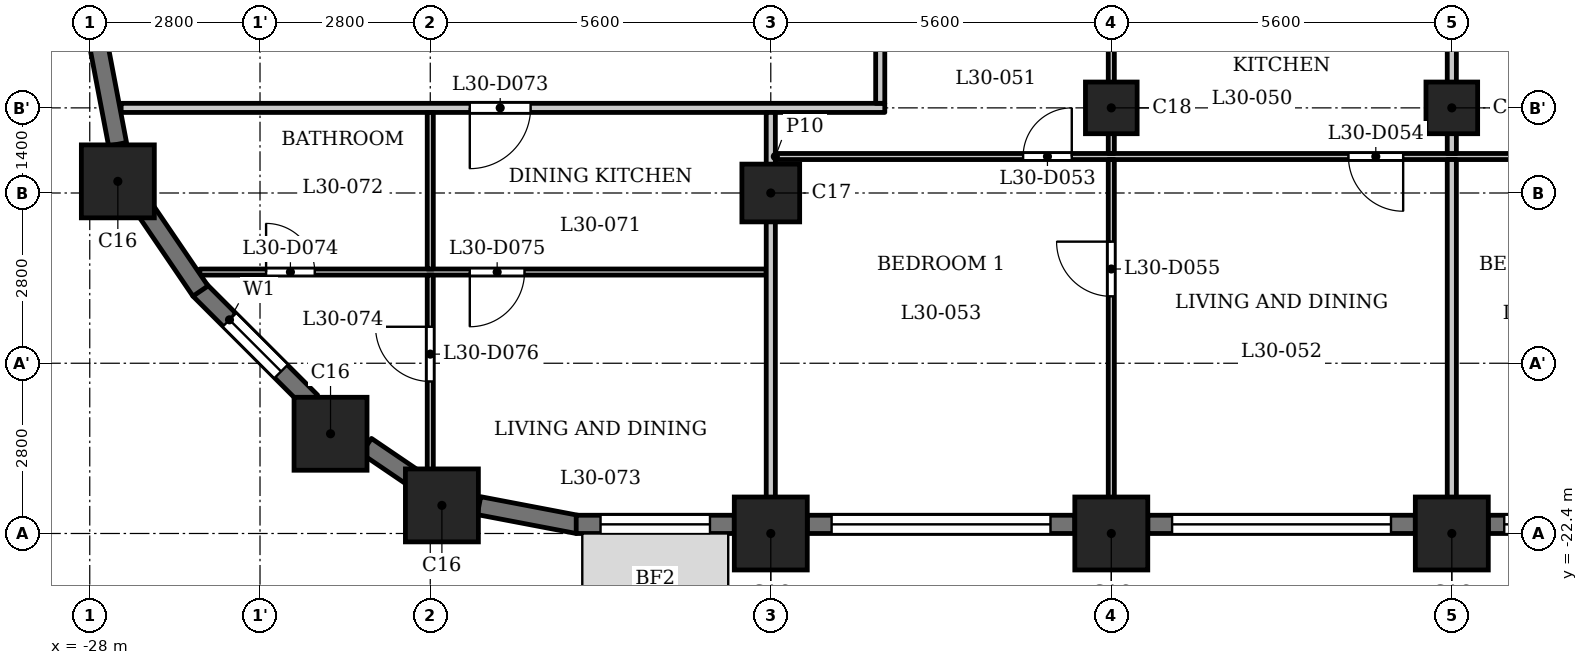
"""IFC4 building model, lengths in metres.
Left out: names, types, materials, properties, quantities, classifications, styles, units other than length and angle.
Written with IfcOpenShell. Run it as: python <this file> out.ifc"""

import sys

from ifc_helpers import new_model, si_unit, direction, frame, frame_2d, origin, origin_2d, place, context, subcontext, project, spatial, rectangle, extrude, element, fill, save


model = new_model("IFC4")
c1 = context("Model", 3, precision=1e-05, world=origin(), true_north=direction((0.0, 1.0)))
c2 = subcontext(c1, "Body", "Model", "MODEL_VIEW")
j1 = project(units=[si_unit("LENGTHUNIT", "METRE"), si_unit("PLANEANGLEUNIT", "RADIAN")], contexts=[c1])
p1 = place(None, origin())
s1 = spatial("IfcSite", under=j1, at=p1, CompositionType="ELEMENT")
p2 = place(p1, origin())
s2 = spatial("IfcBuilding", under=s1, at=p2, CompositionType="ELEMENT")
p3 = place(p2, frame((0.0, 0.0, 118.3)))
s3 = spatial("IfcBuildingStorey", under=s2, at=p3, CompositionType="ELEMENT", Elevation=118.3)
for number, where, z_axis, x_axis in (
    (1, (-22.209, -21.938, 0.0), (0.0, 0.0, 1.0), (1.0, 0.0, 0.0)),
    (2, (-16.8, -22.4, 0.0), (0.0, 0.0, 1.0), (1.0, 0.0, 0.0)),
    (3, (-11.2, -22.4, 0.0), (0.0, 0.0, 1.0), (1.0, 0.0, 0.0)),
    (4, (-5.6, -22.4, 0.0), (0.0, 0.0, 1.0), (1.0, 0.0, 0.0)),
    (5, (-27.538, -16.609, 0.0), (0.0, 0.0, 1.0), (1.0, 0.0, 0.0)),
    (6, (-24.04, -20.76, 0.0), (0.0, 0.0, 1.0), (1.0, 0.0, 0.0)),
):
    element("IfcColumn", number, at=place(p3, frame(where, z_axis=z_axis, x_axis=x_axis)), inside=s3, PredefinedType="COLUMN", context=c2, shape_type="SweptSolid", body=[
        extrude(rectangle(XDim=1.2, YDim=1.2, at=origin_2d()), origin(), (0.0, 0.0, 1.0), 3.5),
    ])
p4 = place(p3, frame((-16.8, -16.8, 0.0), z_axis=(0.0, 0.0, 1.0), x_axis=(1.0, 0.0, 0.0)))
e7 = element("IfcColumn", 7, at=p4, inside=s3, PredefinedType="COLUMN", context=c2, shape_type="SweptSolid", body=[
    extrude(rectangle(XDim=0.95, YDim=0.95, at=origin_2d()), origin(), (0.0, 0.0, 1.0), 3.5),
])
for number, where, z_axis, x_axis in (
    (8, (-11.2, -15.4, 0.0), (0.0, 0.0, 1.0), (1.0, 0.0, 0.0)),
    (9, (-5.6, -15.4, 0.0), (0.0, 0.0, 1.0), (1.0, 0.0, 0.0)),
):
    element("IfcColumn", number, at=place(p3, frame(where, z_axis=z_axis, x_axis=x_axis)), inside=s3, PredefinedType="COLUMN", context=c2, shape_type="SweptSolid", body=[
        extrude(rectangle(XDim=0.85, YDim=0.85, at=origin_2d()), origin(), (0.0, 0.0, 1.0), 3.5),
    ])
p5 = place(p3, frame((-26.197, -18.391, 0.0), z_axis=(0.0, 0.0, 1.0), x_axis=(0.707059830104, -0.707153729152, 0.0)))
e10 = element("IfcWall", 10, at=p5, inside=s3, PredefinedType="SOLIDWALL", context=c2, shape_type="SweptSolid", body=[
    extrude(rectangle(XDim=2.6, YDim=0.3, at=frame_2d((1.3, 0.0))), origin(), (0.0, 0.0, 1.0), 2.4),
])
p6 = place(p5, frame((0.7, 0.0, 0.6)))
e11 = element("IfcOpeningElement", 11, at=p6, cuts=e10, PredefinedType="OPENING", context=c2, shape_type="SweptSolid", body=[
    extrude(rectangle(XDim=1.2, YDim=1.55, at=frame_2d((0.6, 0.775))), frame((0.0, 0.16, 0.0), z_axis=(0.0, -1.0, 0.0), x_axis=(1.0, 0.0, 0.0)), (0.0, 0.0, 1.0), 0.32),
])
p7 = place(p3, frame((-23.451, -20.96, 0.0), z_axis=(0.0, 0.0, 1.0), x_axis=(0.827019434577, -0.562173331661, 0.0)))
e12 = element("IfcWall", 12, at=p7, inside=s3, PredefinedType="SOLIDWALL", context=c2, shape_type="SweptSolid", body=[
    extrude(rectangle(XDim=0.977, YDim=0.3, at=frame_2d((0.489, 0.0))), origin(), (0.0, 0.0, 1.0), 3.2),
])
p8 = place(p3, frame((-21.599, -21.942, 0.0), z_axis=(0.0, 0.0, 1.0), x_axis=(0.98228820662, -0.187376303559, 0.0)))
e13 = element("IfcWall", 13, at=p8, inside=s3, PredefinedType="SOLIDWALL", context=c2, shape_type="SweptSolid", body=[
    extrude(rectangle(XDim=1.656, YDim=0.3, at=frame_2d((0.828, 0.0))), origin(), (0.0, 0.0, 1.0), 2.4),
])
p9 = place(p3, frame((-20.0, -22.25, 0.0), z_axis=(0.0, 0.0, 1.0), x_axis=(1.0, 0.0, 0.0)))
e14 = element("IfcWall", 14, at=p9, inside=s3, PredefinedType="SOLIDWALL", context=c2, shape_type="SweptSolid", body=[
    extrude(rectangle(XDim=2.6, YDim=0.3, at=frame_2d((1.3, 0.0))), origin(), (0.0, 0.0, 1.0), 2.4),
])
p10 = place(p9, frame((0.4, 0.0, 0.9)))
e15 = element("IfcOpeningElement", 15, at=p10, cuts=e14, PredefinedType="OPENING", context=c2, shape_type="SweptSolid", body=[
    extrude(rectangle(XDim=1.8, YDim=1.25, at=frame_2d((0.9, 0.625))), frame((0.0, 0.16, 0.0), z_axis=(0.0, -1.0, 0.0), x_axis=(1.0, 0.0, 0.0)), (0.0, 0.0, 1.0), 0.32),
])
p11 = place(p3, frame((-16.2, -22.25, 0.0), z_axis=(0.0, 0.0, 1.0), x_axis=(1.0, 0.0, 0.0)))
e16 = element("IfcWall", 16, at=p11, inside=s3, PredefinedType="SOLIDWALL", context=c2, shape_type="SweptSolid", body=[
    extrude(rectangle(XDim=4.4, YDim=0.3, at=frame_2d((2.2, 0.0))), origin(), (0.0, 0.0, 1.0), 2.4),
])
p12 = place(p11, frame((0.4, 0.0, 1.2)))
e17 = element("IfcOpeningElement", 17, at=p12, cuts=e16, PredefinedType="OPENING", context=c2, shape_type="SweptSolid", body=[
    extrude(rectangle(XDim=3.6, YDim=0.95, at=frame_2d((1.8, 0.475))), frame((0.0, 0.16, 0.0), z_axis=(0.0, -1.0, 0.0), x_axis=(1.0, 0.0, 0.0)), (0.0, 0.0, 1.0), 0.32),
])
p13 = place(p3, frame((-10.6, -22.25, 0.0), z_axis=(0.0, 0.0, 1.0), x_axis=(1.0, 0.0, 0.0)))
e18 = element("IfcWall", 18, at=p13, inside=s3, PredefinedType="SOLIDWALL", context=c2, shape_type="SweptSolid", body=[
    extrude(rectangle(XDim=4.4, YDim=0.3, at=frame_2d((2.2, 0.0))), origin(), (0.0, 0.0, 1.0), 2.4),
])
p14 = place(p13, frame((0.4, 0.0, 1.2)))
e19 = element("IfcOpeningElement", 19, at=p14, cuts=e18, PredefinedType="OPENING", context=c2, shape_type="SweptSolid", body=[
    extrude(rectangle(XDim=3.6, YDim=0.95, at=frame_2d((1.8, 0.475))), frame((0.0, 0.16, 0.0), z_axis=(0.0, -1.0, 0.0), x_axis=(1.0, 0.0, 0.0)), (0.0, 0.0, 1.0), 0.32),
])
p15 = place(p3, frame((-5.0, -22.25, 0.0), z_axis=(0.0, 0.0, 1.0), x_axis=(1.0, 0.0, 0.0)))
e20 = element("IfcWall", 20, at=p15, inside=s3, PredefinedType="SOLIDWALL", context=c2, shape_type="SweptSolid", body=[
    extrude(rectangle(XDim=4.4, YDim=0.3, at=frame_2d((2.2, 0.0))), origin(), (0.0, 0.0, 1.0), 2.4),
])
p16 = place(p15, frame((0.262, 0.0, 0.9)))
e21 = element("IfcOpeningElement", 21, at=p16, cuts=e20, PredefinedType="OPENING", context=c2, shape_type="SweptSolid", body=[
    extrude(rectangle(XDim=1.8, YDim=1.25, at=frame_2d((0.9, 0.625))), frame((0.0, 0.16, 0.0), z_axis=(0.0, -1.0, 0.0), x_axis=(1.0, 0.0, 0.0)), (0.0, 0.0, 1.0), 0.32),
])
p17 = place(p15, frame((2.837, 0.0, 0.6)))
e22 = element("IfcOpeningElement", 22, at=p17, cuts=e20, PredefinedType="OPENING", context=c2, shape_type="SweptSolid", body=[
    extrude(rectangle(XDim=1.2, YDim=1.55, at=frame_2d((0.6, 0.775))), frame((0.0, 0.16, 0.0), z_axis=(0.0, -1.0, 0.0), x_axis=(1.0, 0.0, 0.0)), (0.0, 0.0, 1.0), 0.32),
])
for number, where, z_axis, x_axis in (
    (23, (-27.853, -14.372, 0.0), (0.0, 0.0, 1.0), (0.187, -0.982, 0.0)),
    (24, (-27.11, -17.043, 0.0), (0.0, 0.0, 1.0), (0.562, -0.827, 0.0)),
):
    element("IfcWall", number, at=place(p3, frame(where, z_axis=z_axis, x_axis=x_axis)), inside=s3, PredefinedType="SOLIDWALL", context=c2, shape_type="SweptSolid", body=[
        extrude(rectangle(XDim=1.656, YDim=0.3, at=frame_2d((0.828, 0.0))), origin(), (0.0, 0.0, 1.0), 2.4),
    ])
p18 = place(p3, frame((-26.19, -18.1, 0.0), z_axis=(0.0, 0.0, 1.0), x_axis=(1.0, 0.0, 0.0)))
e25 = element("IfcWall", 25, at=p18, inside=s3, PredefinedType="PARTITIONING", context=c2, shape_type="SweptSolid", body=[
    extrude(rectangle(XDim=9.315, YDim=0.1, at=frame_2d((4.658, 0.0))), origin(), (0.0, 0.0, 1.0), 3.2),
])
p19 = place(p18, frame((1.09, 0.0, 0.0)))
e26 = element("IfcOpeningElement", 26, at=p19, cuts=e25, PredefinedType="OPENING", context=c2, shape_type="SweptSolid", body=[
    extrude(rectangle(XDim=0.8, YDim=2.1, at=frame_2d((0.4, 1.05))), frame((0.0, 0.06, 0.0), z_axis=(0.0, -1.0, 0.0), x_axis=(1.0, 0.0, 0.0)), (0.0, 0.0, 1.0), 0.12),
])
p20 = place(p18, frame((4.44, 0.0, 0.0)))
e27 = element("IfcOpeningElement", 27, at=p20, cuts=e25, PredefinedType="OPENING", context=c2, shape_type="SweptSolid", body=[
    extrude(rectangle(XDim=0.9, YDim=2.1, at=frame_2d((0.45, 1.05))), frame((0.0, 0.06, 0.0), z_axis=(0.0, -1.0, 0.0), x_axis=(1.0, 0.0, 0.0)), (0.0, 0.0, 1.0), 0.12),
])
p21 = place(p3, frame((-16.725, -16.2, 0.0), z_axis=(0.0, 0.0, 1.0), x_axis=(1.0, 0.0, 0.0)))
e28 = element("IfcWall", 28, at=p21, inside=s3, PredefinedType="PARTITIONING", context=c2, shape_type="SweptSolid", body=[
    extrude(rectangle(XDim=33.45, YDim=0.1, at=frame_2d((16.725, 0.0))), origin(), (0.0, 0.0, 1.0), 3.2),
])
p22 = place(p21, frame((4.075, 0.0, 0.0)))
e29 = element("IfcOpeningElement", 29, at=p22, cuts=e28, PredefinedType="OPENING", context=c2, shape_type="SweptSolid", body=[
    extrude(rectangle(XDim=0.8, YDim=2.1, at=frame_2d((0.4, 1.05))), frame((0.0, 0.06, 0.0), z_axis=(0.0, -1.0, 0.0), x_axis=(1.0, 0.0, 0.0)), (0.0, 0.0, 1.0), 0.12),
])
p23 = place(p21, frame((9.425, 0.0, 0.0)))
e30 = element("IfcOpeningElement", 30, at=p23, cuts=e28, PredefinedType="OPENING", context=c2, shape_type="SweptSolid", body=[
    extrude(rectangle(XDim=0.9, YDim=2.1, at=frame_2d((0.45, 1.05))), frame((0.0, 0.06, 0.0), z_axis=(0.0, -1.0, 0.0), x_axis=(1.0, 0.0, 0.0)), (0.0, 0.0, 1.0), 0.12),
])
p24 = place(p21, frame((19.875, 0.0, 0.0)))
e31 = element("IfcOpeningElement", 31, at=p24, cuts=e28, PredefinedType="OPENING", context=c2, shape_type="SweptSolid", body=[
    extrude(rectangle(XDim=0.8, YDim=2.1, at=frame_2d((0.4, 1.05))), frame((0.0, 0.06, 0.0), z_axis=(0.0, -1.0, 0.0), x_axis=(1.0, 0.0, 0.0)), (0.0, 0.0, 1.0), 0.12),
])
p25 = place(p21, frame((17.375, 0.0, 0.0)))
e32 = element("IfcOpeningElement", 32, at=p25, cuts=e28, PredefinedType="OPENING", context=c2, shape_type="SweptSolid", body=[
    extrude(rectangle(XDim=0.9, YDim=2.1, at=frame_2d((0.45, 1.05))), frame((0.0, 0.06, 0.0), z_axis=(0.0, -1.0, 0.0), x_axis=(1.0, 0.0, 0.0)), (0.0, 0.0, 1.0), 0.12),
])
p26 = place(p21, frame((12.525, 0.0, 0.0)))
e33 = element("IfcOpeningElement", 33, at=p26, cuts=e28, PredefinedType="OPENING", context=c2, shape_type="SweptSolid", body=[
    extrude(rectangle(XDim=0.9, YDim=2.1, at=frame_2d((0.45, 1.05))), frame((0.0, 0.06, 0.0), z_axis=(0.0, -1.0, 0.0), x_axis=(1.0, 0.0, 0.0)), (0.0, 0.0, 1.0), 0.12),
])
p27 = place(p21, frame((14.775, 0.0, 0.0)))
e34 = element("IfcOpeningElement", 34, at=p27, cuts=e28, PredefinedType="OPENING", context=c2, shape_type="SweptSolid", body=[
    extrude(rectangle(XDim=0.9, YDim=2.1, at=frame_2d((0.45, 1.05))), frame((0.0, 0.06, 0.0), z_axis=(0.0, -1.0, 0.0), x_axis=(1.0, 0.0, 0.0)), (0.0, 0.0, 1.0), 0.12),
])
p28 = place(p21, frame((26.475, 0.0, 0.0)))
e35 = element("IfcOpeningElement", 35, at=p28, cuts=e28, PredefinedType="OPENING", context=c2, shape_type="SweptSolid", body=[
    extrude(rectangle(XDim=0.8, YDim=2.1, at=frame_2d((0.4, 1.05))), frame((0.0, 0.06, 0.0), z_axis=(0.0, -1.0, 0.0), x_axis=(1.0, 0.0, 0.0)), (0.0, 0.0, 1.0), 0.12),
])
p29 = place(p21, frame((23.725, 0.0, 0.0)))
e36 = element("IfcOpeningElement", 36, at=p29, cuts=e28, PredefinedType="OPENING", context=c2, shape_type="SweptSolid", body=[
    extrude(rectangle(XDim=0.9, YDim=2.1, at=frame_2d((0.45, 1.05))), frame((0.0, 0.06, 0.0), z_axis=(0.0, -1.0, 0.0), x_axis=(1.0, 0.0, 0.0)), (0.0, 0.0, 1.0), 0.12),
])
p30 = place(p21, frame((29.075, 0.0, 0.0)))
e37 = element("IfcOpeningElement", 37, at=p30, cuts=e28, PredefinedType="OPENING", context=c2, shape_type="SweptSolid", body=[
    extrude(rectangle(XDim=0.8, YDim=2.1, at=frame_2d((0.4, 1.05))), frame((0.0, 0.06, 0.0), z_axis=(0.0, -1.0, 0.0), x_axis=(1.0, 0.0, 0.0)), (0.0, 0.0, 1.0), 0.12),
])
p31 = place(p21, frame((30.675, 0.0, 0.0)))
e38 = element("IfcOpeningElement", 38, at=p31, cuts=e28, PredefinedType="OPENING", context=c2, shape_type="SweptSolid", body=[
    extrude(rectangle(XDim=0.9, YDim=2.1, at=frame_2d((0.45, 1.05))), frame((0.0, 0.06, 0.0), z_axis=(0.0, -1.0, 0.0), x_axis=(1.0, 0.0, 0.0)), (0.0, 0.0, 1.0), 0.12),
])
p32 = place(p3, frame((-27.484, -15.4, 0.0), z_axis=(0.0, 0.0, 1.0), x_axis=(1.0, 0.0, 0.0)))
e39 = element("IfcWall", 39, at=p32, inside=s3, PredefinedType="PARTITIONING", context=c2, shape_type="SweptSolid", body=[
    extrude(rectangle(XDim=12.559, YDim=0.15, at=frame_2d((6.279, 0.0))), origin(), (0.0, 0.0, 1.0), 3.2),
])
p33 = place(p32, frame((5.734, 0.0, 0.0)))
e40 = element("IfcOpeningElement", 40, at=p33, cuts=e39, PredefinedType="OPENING", context=c2, shape_type="SweptSolid", body=[
    extrude(rectangle(XDim=1.0, YDim=2.1, at=frame_2d((0.5, 1.05))), frame((0.0, 0.085, 0.0), z_axis=(0.0, -1.0, 0.0), x_axis=(1.0, 0.0, 0.0)), (0.0, 0.0, 1.0), 0.17),
])
p34 = place(p3, frame((-22.4, -21.72, 0.0), z_axis=(0.0, 0.0, 1.0), x_axis=(0.0, 1.0, 0.0)))
e41 = element("IfcWall", 41, at=p34, inside=s3, PredefinedType="PARTITIONING", context=c2, shape_type="SweptSolid", body=[
    extrude(rectangle(XDim=3.57, YDim=0.1, at=frame_2d((1.785, 0.0))), origin(), (0.0, 0.0, 1.0), 3.2),
])
p35 = place(p34, frame((1.82, 0.0, 0.0)))
e42 = element("IfcOpeningElement", 42, at=p35, cuts=e41, PredefinedType="OPENING", context=c2, shape_type="SweptSolid", body=[
    extrude(rectangle(XDim=0.9, YDim=2.1, at=frame_2d((0.45, 1.05))), frame((0.0, 0.06, 0.0), z_axis=(0.0, -1.0, 0.0), x_axis=(1.0, 0.0, 0.0)), (0.0, 0.0, 1.0), 0.12),
])
p36 = place(p3, frame((-22.4, -18.05, 0.0), z_axis=(0.0, 0.0, 1.0), x_axis=(0.0, 1.0, 0.0)))
e43 = element("IfcWall", 43, at=p36, inside=s3, PredefinedType="PARTITIONING", context=c2, shape_type="SweptSolid", body=[
    extrude(rectangle(XDim=2.575, YDim=0.1, at=frame_2d((1.288, 0.0))), origin(), (0.0, 0.0, 1.0), 3.2),
])
p37 = place(p3, frame((-16.8, -22.98, 0.0), z_axis=(0.0, 0.0, 1.0), x_axis=(0.0, 1.0, 0.0)))
e44 = element("IfcWall", 44, at=p37, inside=s3, PredefinedType="PARTITIONING", context=c2, shape_type="SweptSolid", body=[
    extrude(rectangle(XDim=7.505, YDim=0.15, at=frame_2d((3.752, 0.0))), origin(), (0.0, 0.0, 1.0), 3.2),
])
p38 = place(p3, frame((-15.0, -15.325, 0.0), z_axis=(0.0, 0.0, 1.0), x_axis=(0.0, 1.0, 0.0)))
e45 = element("IfcWall", 45, at=p38, inside=s3, PredefinedType="PARTITIONING", context=c2, shape_type="SweptSolid", body=[
    extrude(rectangle(XDim=2.05, YDim=0.15, at=frame_2d((1.025, 0.0))), origin(), (0.0, 0.0, 1.0), 3.2),
])
p39 = place(p3, frame((-11.2, -22.98, 0.0), z_axis=(0.0, 0.0, 1.0), x_axis=(0.0, 1.0, 0.0)))
e46 = element("IfcWall", 46, at=p39, inside=s3, PredefinedType="PARTITIONING", context=c2, shape_type="SweptSolid", body=[
    extrude(rectangle(XDim=6.73, YDim=0.1, at=frame_2d((3.365, 0.0))), origin(), (0.0, 0.0, 1.0), 3.2),
])
p40 = place(p39, frame((4.48, 0.0, 0.0)))
e47 = element("IfcOpeningElement", 47, at=p40, cuts=e46, PredefinedType="OPENING", context=c2, shape_type="SweptSolid", body=[
    extrude(rectangle(XDim=0.9, YDim=2.1, at=frame_2d((0.45, 1.05))), frame((0.0, 0.06, 0.0), z_axis=(0.0, -1.0, 0.0), x_axis=(1.0, 0.0, 0.0)), (0.0, 0.0, 1.0), 0.12),
])
p41 = place(p3, frame((-11.2, -16.15, 0.0), z_axis=(0.0, 0.0, 1.0), x_axis=(0.0, 1.0, 0.0)))
e48 = element("IfcWall", 48, at=p41, inside=s3, PredefinedType="PARTITIONING", context=c2, shape_type="SweptSolid", body=[
    extrude(rectangle(XDim=2.875, YDim=0.1, at=frame_2d((1.438, 0.0))), origin(), (0.0, 0.0, 1.0), 3.2),
])
p42 = place(p3, frame((-5.6, -22.98, 0.0), z_axis=(0.0, 0.0, 1.0), x_axis=(0.0, 1.0, 0.0)))
e49 = element("IfcWall", 49, at=p42, inside=s3, PredefinedType="PARTITIONING", context=c2, shape_type="SweptSolid", body=[
    extrude(rectangle(XDim=6.73, YDim=0.15, at=frame_2d((3.365, 0.0))), origin(), (0.0, 0.0, 1.0), 3.2),
])
p43 = place(p3, frame((-5.6, -16.15, 0.0), z_axis=(0.0, 0.0, 1.0), x_axis=(0.0, 1.0, 0.0)))
e50 = element("IfcWall", 50, at=p43, inside=s3, PredefinedType="PARTITIONING", context=c2, shape_type="SweptSolid", body=[
    extrude(rectangle(XDim=2.875, YDim=0.15, at=frame_2d((1.438, 0.0))), origin(), (0.0, 0.0, 1.0), 3.2),
])
p44 = place(p22, origin())
e51 = element("IfcDoor", 51, at=p44, inside=s3, OperationType="SINGLE_SWING_LEFT", PredefinedType="DOOR", context=c2, shape_type="SweptSolid", body=[
    extrude(rectangle(XDim=0.8, YDim=2.1, at=frame_2d((0.4, 1.05))), frame((0.0, 0.025, 0.0), z_axis=(0.0, -1.0, 0.0), x_axis=(1.0, 0.0, 0.0)), (0.0, 0.0, 1.0), 0.05),
])
fill(e29, e51)
p45 = place(p23, origin())
e52 = element("IfcDoor", 52, at=p45, inside=s3, OperationType="SINGLE_SWING_RIGHT", PredefinedType="DOOR", context=c2, shape_type="SweptSolid", body=[
    extrude(rectangle(XDim=0.9, YDim=2.1, at=frame_2d((0.45, 1.05))), frame((0.0, 0.025, 0.0), z_axis=(0.0, -1.0, 0.0), x_axis=(1.0, 0.0, 0.0)), (0.0, 0.0, 1.0), 0.05),
])
fill(e30, e52)
p46 = place(p40, origin())
e53 = element("IfcDoor", 53, at=p46, inside=s3, OperationType="SINGLE_SWING_LEFT", PredefinedType="DOOR", context=c2, shape_type="SweptSolid", body=[
    extrude(rectangle(XDim=0.9, YDim=2.1, at=frame_2d((0.45, 1.05))), frame((0.0, 0.025, 0.0), z_axis=(0.0, -1.0, 0.0), x_axis=(1.0, 0.0, 0.0)), (0.0, 0.0, 1.0), 0.05),
])
fill(e47, e53)
p47 = place(p33, origin())
e54 = element("IfcDoor", 54, at=p47, inside=s3, OperationType="SINGLE_SWING_LEFT", PredefinedType="DOOR", context=c2, shape_type="SweptSolid", body=[
    extrude(rectangle(XDim=1.0, YDim=2.1, at=frame_2d((0.5, 1.05))), frame((0.0, 0.025, 0.0), z_axis=(0.0, -1.0, 0.0), x_axis=(1.0, 0.0, 0.0)), (0.0, 0.0, 1.0), 0.05),
])
fill(e40, e54)
p48 = place(p19, origin())
e55 = element("IfcDoor", 55, at=p48, inside=s3, OperationType="SINGLE_SWING_RIGHT", PredefinedType="DOOR", context=c2, shape_type="SweptSolid", body=[
    extrude(rectangle(XDim=0.8, YDim=2.1, at=frame_2d((0.4, 1.05))), frame((0.0, 0.025, 0.0), z_axis=(0.0, -1.0, 0.0), x_axis=(1.0, 0.0, 0.0)), (0.0, 0.0, 1.0), 0.05),
])
fill(e26, e55)
p49 = place(p20, origin())
e56 = element("IfcDoor", 56, at=p49, inside=s3, OperationType="SINGLE_SWING_LEFT", PredefinedType="DOOR", context=c2, shape_type="SweptSolid", body=[
    extrude(rectangle(XDim=0.9, YDim=2.1, at=frame_2d((0.45, 1.05))), frame((0.0, 0.025, 0.0), z_axis=(0.0, -1.0, 0.0), x_axis=(1.0, 0.0, 0.0)), (0.0, 0.0, 1.0), 0.05),
])
fill(e27, e56)
p50 = place(p35, origin())
e57 = element("IfcDoor", 57, at=p50, inside=s3, OperationType="SINGLE_SWING_LEFT", PredefinedType="DOOR", context=c2, shape_type="SweptSolid", body=[
    extrude(rectangle(XDim=0.9, YDim=2.1, at=frame_2d((0.45, 1.05))), frame((0.0, 0.025, 0.0), z_axis=(0.0, -1.0, 0.0), x_axis=(1.0, 0.0, 0.0)), (0.0, 0.0, 1.0), 0.05),
])
fill(e42, e57)
p51 = place(p6, origin())
e58 = element("IfcWindow", 58, at=p51, inside=s3, PartitioningType="SINGLE_PANEL", PredefinedType="WINDOW", context=c2, shape_type="SweptSolid", body=[
    extrude(rectangle(XDim=1.2, YDim=1.55, at=frame_2d((0.6, 0.775))), frame((0.0, 0.03, 0.0), z_axis=(0.0, -1.0, 0.0), x_axis=(1.0, 0.0, 0.0)), (0.0, 0.0, 1.0), 0.06),
])
fill(e11, e58)
p52 = place(p10, origin())
e59 = element("IfcWindow", 59, at=p52, inside=s3, PartitioningType="SINGLE_PANEL", PredefinedType="WINDOW", context=c2, shape_type="SweptSolid", body=[
    extrude(rectangle(XDim=1.8, YDim=1.25, at=frame_2d((0.9, 0.625))), frame((0.0, 0.03, 0.0), z_axis=(0.0, -1.0, 0.0), x_axis=(1.0, 0.0, 0.0)), (0.0, 0.0, 1.0), 0.06),
])
fill(e15, e59)
p53 = place(p12, origin())
e60 = element("IfcWindow", 60, at=p53, inside=s3, PartitioningType="SINGLE_PANEL", PredefinedType="WINDOW", context=c2, shape_type="SweptSolid", body=[
    extrude(rectangle(XDim=3.6, YDim=0.95, at=frame_2d((1.8, 0.475))), frame((0.0, 0.03, 0.0), z_axis=(0.0, -1.0, 0.0), x_axis=(1.0, 0.0, 0.0)), (0.0, 0.0, 1.0), 0.06),
])
fill(e17, e60)
p54 = place(p14, origin())
e61 = element("IfcWindow", 61, at=p54, inside=s3, PartitioningType="SINGLE_PANEL", PredefinedType="WINDOW", context=c2, shape_type="SweptSolid", body=[
    extrude(rectangle(XDim=3.6, YDim=0.95, at=frame_2d((1.8, 0.475))), frame((0.0, 0.03, 0.0), z_axis=(0.0, -1.0, 0.0), x_axis=(1.0, 0.0, 0.0)), (0.0, 0.0, 1.0), 0.06),
])
fill(e19, e61)
p55 = place(p16, origin())
e62 = element("IfcWindow", 62, at=p55, inside=s3, PartitioningType="SINGLE_PANEL", PredefinedType="WINDOW", context=c2, shape_type="SweptSolid", body=[
    extrude(rectangle(XDim=1.8, YDim=1.25, at=frame_2d((0.9, 0.625))), frame((0.0, 0.03, 0.0), z_axis=(0.0, -1.0, 0.0), x_axis=(1.0, 0.0, 0.0)), (0.0, 0.0, 1.0), 0.06),
])
fill(e21, e62)
save(model, sys.argv[1])
